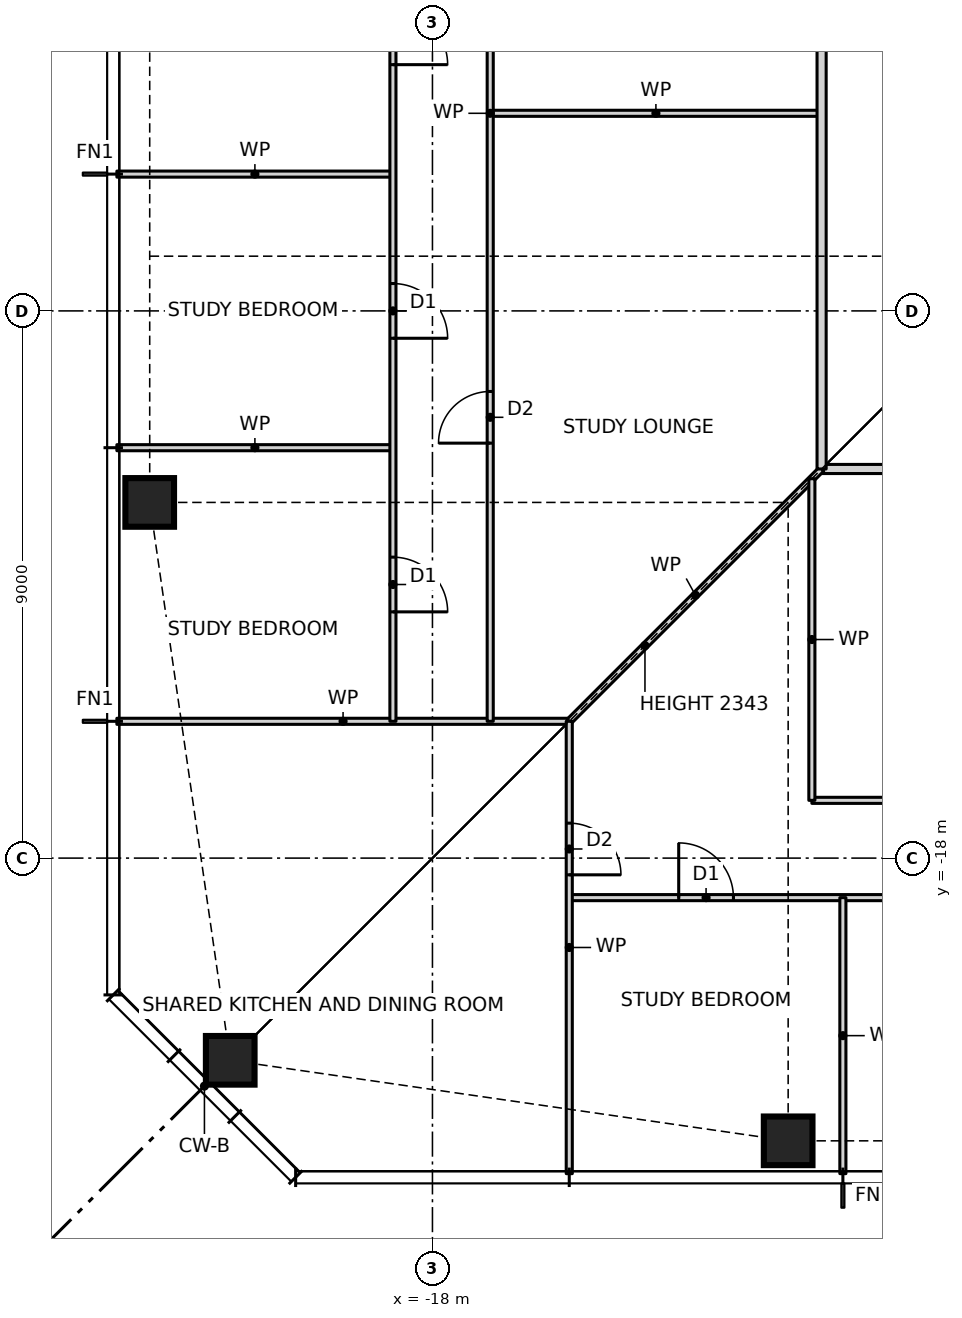
"""IFC4 building model, lengths in metres.
Left out: names, types, materials, properties, quantities, classifications, styles, units other than length and angle.
Written with IfcOpenShell. Run it as: python <this file> out.ifc"""

import sys

from ifc_helpers import new_model, si_unit, direction, frame, frame_2d, origin, origin_2d, place, context, subcontext, project, spatial, rectangle, hollow_rectangle, extrude, element, fill, save


model = new_model("IFC4")
c1 = context("Model", 3, precision=1e-05, world=origin(), true_north=direction((0.0, 1.0)))
c2 = subcontext(c1, "Body", "Model", "MODEL_VIEW")
j1 = project(units=[si_unit("LENGTHUNIT", "METRE"), si_unit("PLANEANGLEUNIT", "RADIAN")], contexts=[c1])
p1 = place(None, origin())
s1 = spatial("IfcSite", under=j1, at=p1, CompositionType="ELEMENT")
p2 = place(p1, origin())
s2 = spatial("IfcBuilding", under=s1, at=p2, CompositionType="ELEMENT")
p3 = place(p2, frame((0.0, 0.0, 29.0)))
s3 = spatial("IfcBuildingStorey", under=s2, at=p3, CompositionType="ELEMENT", Elevation=29.0)
for number, where, z_axis, x_axis in (
    (1, (-21.326, -21.326, 0.0), (0.0, 0.0, 1.0), (1.0, 0.0, 0.0)),
    (2, (-12.15, -22.65, 0.0), (0.0, 0.0, 1.0), (1.0, 0.0, 0.0)),
    (3, (-22.65, -12.15, 0.0), (0.0, 0.0, 1.0), (1.0, 0.0, 0.0)),
):
    element("IfcColumn", number, at=place(p3, frame(where, z_axis=z_axis, x_axis=x_axis)), inside=s3, PredefinedType="COLUMN", context=c2, shape_type="SweptSolid", body=[
        extrude(hollow_rectangle(XDim=0.8, YDim=0.8, WallThickness=0.09, at=origin_2d()), origin(), (0.0, 0.0, 1.0), 3.5),
    ])
p4 = place(p3, frame((-15.75, -18.65, 0.0), z_axis=(0.0, 0.0, 1.0), x_axis=(1.0, 0.0, 0.0)))
e4 = element("IfcWall", 4, at=p4, inside=s3, PredefinedType="PARTITIONING", context=c2, shape_type="SweptSolid", body=[
    extrude(rectangle(XDim=27.0, YDim=0.1, at=frame_2d((13.5, 0.0))), origin(), (0.0, 0.0, 1.0), 3.27),
])
p5 = place(p4, frame((1.8, 0.0, 0.0)))
e5 = element("IfcOpeningElement", 5, at=p5, cuts=e4, PredefinedType="OPENING", context=c2, shape_type="SweptSolid", body=[
    extrude(rectangle(XDim=0.9, YDim=2.1, at=frame_2d((0.45, 1.05))), frame((0.0, 0.06, 0.0), z_axis=(0.0, -1.0, 0.0), x_axis=(1.0, 0.0, 0.0)), (0.0, 0.0, 1.0), 0.12),
])
p6 = place(p4, frame((6.3, 0.0, 0.0)))
e6 = element("IfcOpeningElement", 6, at=p6, cuts=e4, PredefinedType="OPENING", context=c2, shape_type="SweptSolid", body=[
    extrude(rectangle(XDim=0.9, YDim=2.1, at=frame_2d((0.45, 1.05))), frame((0.0, 0.06, 0.0), z_axis=(0.0, -1.0, 0.0), x_axis=(1.0, 0.0, 0.0)), (0.0, 0.0, 1.0), 0.12),
])
p7 = place(p4, frame((10.8, 0.0, 0.0)))
e7 = element("IfcOpeningElement", 7, at=p7, cuts=e4, PredefinedType="OPENING", context=c2, shape_type="SweptSolid", body=[
    extrude(rectangle(XDim=0.9, YDim=2.1, at=frame_2d((0.45, 1.05))), frame((0.0, 0.06, 0.0), z_axis=(0.0, -1.0, 0.0), x_axis=(1.0, 0.0, 0.0)), (0.0, 0.0, 1.0), 0.12),
])
p8 = place(p4, frame((15.3, 0.0, 0.0)))
e8 = element("IfcOpeningElement", 8, at=p8, cuts=e4, PredefinedType="OPENING", context=c2, shape_type="SweptSolid", body=[
    extrude(rectangle(XDim=0.9, YDim=2.1, at=frame_2d((0.45, 1.05))), frame((0.0, 0.06, 0.0), z_axis=(0.0, -1.0, 0.0), x_axis=(1.0, 0.0, 0.0)), (0.0, 0.0, 1.0), 0.12),
])
p9 = place(p4, frame((19.8, 0.0, 0.0)))
e9 = element("IfcOpeningElement", 9, at=p9, cuts=e4, PredefinedType="OPENING", context=c2, shape_type="SweptSolid", body=[
    extrude(rectangle(XDim=0.9, YDim=2.1, at=frame_2d((0.45, 1.05))), frame((0.0, 0.06, 0.0), z_axis=(0.0, -1.0, 0.0), x_axis=(1.0, 0.0, 0.0)), (0.0, 0.0, 1.0), 0.12),
])
p10 = place(p4, frame((24.3, 0.0, 0.0)))
e10 = element("IfcOpeningElement", 10, at=p10, cuts=e4, PredefinedType="OPENING", context=c2, shape_type="SweptSolid", body=[
    extrude(rectangle(XDim=0.9, YDim=2.1, at=frame_2d((0.45, 1.05))), frame((0.0, 0.06, 0.0), z_axis=(0.0, -1.0, 0.0), x_axis=(1.0, 0.0, 0.0)), (0.0, 0.0, 1.0), 0.12),
])
p11 = place(p3, frame((-11.76, -17.05, 0.0), z_axis=(0.0, 0.0, 1.0), x_axis=(1.0, 0.0, 0.0)))
e11 = element("IfcWall", 11, at=p11, inside=s3, PredefinedType="PARTITIONING", context=c2, shape_type="SweptSolid", body=[
    extrude(rectangle(XDim=15.51, YDim=0.1, at=frame_2d((7.755, 0.0))), origin(), (0.0, 0.0, 1.0), 3.27),
])
p12 = place(p11, frame((7.33, 0.0, 0.0)))
e12 = element("IfcOpeningElement", 12, at=p12, cuts=e11, PredefinedType="OPENING", context=c2, shape_type="SweptSolid", body=[
    extrude(rectangle(XDim=0.85, YDim=2.1, at=frame_2d((0.425, 1.05))), frame((0.0, 0.06, 0.0), z_axis=(0.0, -1.0, 0.0), x_axis=(1.0, 0.0, 0.0)), (0.0, 0.0, 1.0), 0.12),
])
p13 = place(p3, frame((-23.19, -15.75, 0.0), z_axis=(0.0, 0.0, 1.0), x_axis=(1.0, 0.0, 0.0)))
e13 = element("IfcWall", 13, at=p13, inside=s3, PredefinedType="PARTITIONING", context=c2, shape_type="SweptSolid", body=[
    extrude(rectangle(XDim=7.44, YDim=0.1, at=frame_2d((3.72, 0.0))), origin(), (0.0, 0.0, 1.0), 3.27),
])
p14 = place(p3, frame((-11.6, -11.6, 0.0), z_axis=(0.0, 0.0, 1.0), x_axis=(1.0, 0.0, 0.0)))
e14 = element("IfcWall", 14, at=p14, inside=s3, PredefinedType="PARTITIONING", context=c2, shape_type="SweptSolid", body=[
    extrude(rectangle(XDim=24.2, YDim=0.15, at=frame_2d((12.1, 0.0))), origin(), (0.0, 0.0, 1.0), 3.27),
])
p15 = place(p14, frame((16.05, 0.0, 0.0)))
e15 = element("IfcOpeningElement", 15, at=p15, cuts=e14, PredefinedType="OPENING", context=c2, shape_type="SweptSolid", body=[
    extrude(rectangle(XDim=1.0, YDim=2.1, at=frame_2d((0.5, 1.05))), frame((0.0, 0.085, 0.0), z_axis=(0.0, -1.0, 0.0), x_axis=(1.0, 0.0, 0.0)), (0.0, 0.0, 1.0), 0.17),
])
for number, where, z_axis, x_axis in (
    (16, (-23.19, -11.25, 0.0), (0.0, 0.0, 1.0), (1.0, 0.0, 0.0)),
    (17, (-23.19, -6.75, 0.0), (0.0, 0.0, 1.0), (1.0, 0.0, 0.0)),
):
    element("IfcWall", number, at=place(p3, frame(where, z_axis=z_axis, x_axis=x_axis)), inside=s3, PredefinedType="PARTITIONING", context=c2, shape_type="SweptSolid", body=[
        extrude(rectangle(XDim=4.54, YDim=0.1, at=frame_2d((2.27, 0.0))), origin(), (0.0, 0.0, 1.0), 3.27),
    ])
p16 = place(p3, frame((-17.05, -5.75, 0.0), z_axis=(0.0, 0.0, 1.0), x_axis=(1.0, 0.0, 0.0)))
e18 = element("IfcWall", 18, at=p16, inside=s3, PredefinedType="PARTITIONING", context=c2, shape_type="SweptSolid", body=[
    extrude(rectangle(XDim=5.45, YDim=0.1, at=frame_2d((2.725, 0.0))), origin(), (0.0, 0.0, 1.0), 3.27),
])
p17 = place(p3, frame((-15.75, -15.75, 0.0), z_axis=(0.0, 0.0, 1.0), x_axis=(0.707106781187, 0.707106781187, 0.0)))
e19 = element("IfcWall", 19, at=p17, inside=s3, PredefinedType="PARTITIONING", context=c2, shape_type="SweptSolid", body=[
    extrude(rectangle(XDim=5.869, YDim=0.1, at=frame_2d((2.935, 0.0))), origin(), (0.0, 0.0, 1.0), 2.343),
])
p18 = place(p3, frame((-11.25, -23.19, 0.0), z_axis=(0.0, 0.0, 1.0), x_axis=(0.0, 1.0, 0.0)))
e20 = element("IfcWall", 20, at=p18, inside=s3, PredefinedType="PARTITIONING", context=c2, shape_type="SweptSolid", body=[
    extrude(rectangle(XDim=4.54, YDim=0.1, at=frame_2d((2.27, 0.0))), origin(), (0.0, 0.0, 1.0), 3.27),
])
p19 = place(p3, frame((-11.6, -11.6, 0.0), z_axis=(0.0, 0.0, 1.0), x_axis=(0.0, 1.0, 0.0)))
e21 = element("IfcWall", 21, at=p19, inside=s3, PredefinedType="PARTITIONING", context=c2, shape_type="SweptSolid", body=[
    extrude(rectangle(XDim=23.2, YDim=0.15, at=frame_2d((11.6, 0.0))), origin(), (0.0, 0.0, 1.0), 3.27),
])
p20 = place(p19, frame((20.55, 0.0, 0.0)))
e22 = element("IfcOpeningElement", 22, at=p20, cuts=e21, PredefinedType="OPENING", context=c2, shape_type="SweptSolid", body=[
    extrude(rectangle(XDim=1.0, YDim=2.1, at=frame_2d((0.5, 1.05))), frame((0.0, 0.085, 0.0), z_axis=(0.0, -1.0, 0.0), x_axis=(1.0, 0.0, 0.0)), (0.0, 0.0, 1.0), 0.17),
])
p21 = place(p19, frame((18.5, 0.0, 0.0)))
e23 = element("IfcOpeningElement", 23, at=p21, cuts=e21, PredefinedType="OPENING", context=c2, shape_type="SweptSolid", body=[
    extrude(rectangle(XDim=0.9, YDim=2.1, at=frame_2d((0.45, 1.05))), frame((0.0, 0.085, 0.0), z_axis=(0.0, -1.0, 0.0), x_axis=(1.0, 0.0, 0.0)), (0.0, 0.0, 1.0), 0.17),
])
p22 = place(p3, frame((-11.76, -17.05, 0.0), z_axis=(0.0, 0.0, 1.0), x_axis=(0.0, 1.0, 0.0)))
e24 = element("IfcWall", 24, at=p22, inside=s3, PredefinedType="PARTITIONING", context=c2, shape_type="SweptSolid", body=[
    extrude(rectangle(XDim=5.29, YDim=0.1, at=frame_2d((2.645, 0.0))), origin(), (0.0, 0.0, 1.0), 3.27),
])
p23 = place(p3, frame((-15.75, -23.19, 0.0), z_axis=(0.0, 0.0, 1.0), x_axis=(0.0, 1.0, 0.0)))
e25 = element("IfcWall", 25, at=p23, inside=s3, PredefinedType="PARTITIONING", context=c2, shape_type="SweptSolid", body=[
    extrude(rectangle(XDim=7.44, YDim=0.1, at=frame_2d((3.72, 0.0))), origin(), (0.0, 0.0, 1.0), 3.27),
])
p24 = place(p23, frame((4.915, 0.0, 0.0)))
e26 = element("IfcOpeningElement", 26, at=p24, cuts=e25, PredefinedType="OPENING", context=c2, shape_type="SweptSolid", body=[
    extrude(rectangle(XDim=0.85, YDim=2.1, at=frame_2d((0.425, 1.05))), frame((0.0, 0.06, 0.0), z_axis=(0.0, -1.0, 0.0), x_axis=(1.0, 0.0, 0.0)), (0.0, 0.0, 1.0), 0.12),
])
p25 = place(p3, frame((-17.05, -15.75, 0.0), z_axis=(0.0, 0.0, 1.0), x_axis=(0.0, 1.0, 0.0)))
e27 = element("IfcWall", 27, at=p25, inside=s3, PredefinedType="PARTITIONING", context=c2, shape_type="SweptSolid", body=[
    extrude(rectangle(XDim=20.0, YDim=0.1, at=frame_2d((10.0, 0.0))), origin(), (0.0, 0.0, 1.0), 3.27),
])
p26 = place(p25, frame((14.575, 0.0, 0.0)))
e28 = element("IfcOpeningElement", 28, at=p26, cuts=e27, PredefinedType="OPENING", context=c2, shape_type="SweptSolid", body=[
    extrude(rectangle(XDim=0.85, YDim=2.1, at=frame_2d((0.425, 1.05))), frame((0.0, 0.06, 0.0), z_axis=(0.0, -1.0, 0.0), x_axis=(1.0, 0.0, 0.0)), (0.0, 0.0, 1.0), 0.12),
])
p27 = place(p25, frame((4.575, 0.0, 0.0)))
e29 = element("IfcOpeningElement", 29, at=p27, cuts=e27, PredefinedType="OPENING", context=c2, shape_type="SweptSolid", body=[
    extrude(rectangle(XDim=0.85, YDim=2.1, at=frame_2d((0.425, 1.05))), frame((0.0, 0.06, 0.0), z_axis=(0.0, -1.0, 0.0), x_axis=(1.0, 0.0, 0.0)), (0.0, 0.0, 1.0), 0.12),
])
p28 = place(p3, frame((-18.65, -15.75, 0.0), z_axis=(0.0, 0.0, 1.0), x_axis=(0.0, 1.0, 0.0)))
e30 = element("IfcWall", 30, at=p28, inside=s3, PredefinedType="PARTITIONING", context=c2, shape_type="SweptSolid", body=[
    extrude(rectangle(XDim=31.5, YDim=0.1, at=frame_2d((15.75, 0.0))), origin(), (0.0, 0.0, 1.0), 3.27),
])
p29 = place(p28, frame((28.8, 0.0, 0.0)))
e31 = element("IfcOpeningElement", 31, at=p29, cuts=e30, PredefinedType="OPENING", context=c2, shape_type="SweptSolid", body=[
    extrude(rectangle(XDim=0.9, YDim=2.1, at=frame_2d((0.45, 1.05))), frame((0.0, 0.06, 0.0), z_axis=(0.0, -1.0, 0.0), x_axis=(1.0, 0.0, 0.0)), (0.0, 0.0, 1.0), 0.12),
])
p30 = place(p28, frame((24.3, 0.0, 0.0)))
e32 = element("IfcOpeningElement", 32, at=p30, cuts=e30, PredefinedType="OPENING", context=c2, shape_type="SweptSolid", body=[
    extrude(rectangle(XDim=0.9, YDim=2.1, at=frame_2d((0.45, 1.05))), frame((0.0, 0.06, 0.0), z_axis=(0.0, -1.0, 0.0), x_axis=(1.0, 0.0, 0.0)), (0.0, 0.0, 1.0), 0.12),
])
p31 = place(p28, frame((19.8, 0.0, 0.0)))
e33 = element("IfcOpeningElement", 33, at=p31, cuts=e30, PredefinedType="OPENING", context=c2, shape_type="SweptSolid", body=[
    extrude(rectangle(XDim=0.9, YDim=2.1, at=frame_2d((0.45, 1.05))), frame((0.0, 0.06, 0.0), z_axis=(0.0, -1.0, 0.0), x_axis=(1.0, 0.0, 0.0)), (0.0, 0.0, 1.0), 0.12),
])
p32 = place(p28, frame((15.3, 0.0, 0.0)))
e34 = element("IfcOpeningElement", 34, at=p32, cuts=e30, PredefinedType="OPENING", context=c2, shape_type="SweptSolid", body=[
    extrude(rectangle(XDim=0.9, YDim=2.1, at=frame_2d((0.45, 1.05))), frame((0.0, 0.06, 0.0), z_axis=(0.0, -1.0, 0.0), x_axis=(1.0, 0.0, 0.0)), (0.0, 0.0, 1.0), 0.12),
])
p33 = place(p28, frame((10.8, 0.0, 0.0)))
e35 = element("IfcOpeningElement", 35, at=p33, cuts=e30, PredefinedType="OPENING", context=c2, shape_type="SweptSolid", body=[
    extrude(rectangle(XDim=0.9, YDim=2.1, at=frame_2d((0.45, 1.05))), frame((0.0, 0.06, 0.0), z_axis=(0.0, -1.0, 0.0), x_axis=(1.0, 0.0, 0.0)), (0.0, 0.0, 1.0), 0.12),
])
p34 = place(p28, frame((6.3, 0.0, 0.0)))
e36 = element("IfcOpeningElement", 36, at=p34, cuts=e30, PredefinedType="OPENING", context=c2, shape_type="SweptSolid", body=[
    extrude(rectangle(XDim=0.9, YDim=2.1, at=frame_2d((0.45, 1.05))), frame((0.0, 0.06, 0.0), z_axis=(0.0, -1.0, 0.0), x_axis=(1.0, 0.0, 0.0)), (0.0, 0.0, 1.0), 0.12),
])
p35 = place(p28, frame((1.8, 0.0, 0.0)))
e37 = element("IfcOpeningElement", 37, at=p35, cuts=e30, PredefinedType="OPENING", context=c2, shape_type="SweptSolid", body=[
    extrude(rectangle(XDim=0.9, YDim=2.1, at=frame_2d((0.45, 1.05))), frame((0.0, 0.06, 0.0), z_axis=(0.0, -1.0, 0.0), x_axis=(1.0, 0.0, 0.0)), (0.0, 0.0, 1.0), 0.12),
])
p36 = place(p5, origin())
e38 = element("IfcDoor", 38, at=p36, inside=s3, OperationType="SINGLE_SWING_LEFT", PredefinedType="DOOR", context=c2, shape_type="SweptSolid", body=[
    extrude(rectangle(XDim=0.9, YDim=2.1, at=frame_2d((0.45, 1.05))), frame((0.0, 0.025, 0.0), z_axis=(0.0, -1.0, 0.0), x_axis=(1.0, 0.0, 0.0)), (0.0, 0.0, 1.0), 0.05),
])
fill(e5, e38)
p37 = place(p33, frame((0.9, 0.0, 0.0), z_axis=(0.0, 0.0, 1.0), x_axis=(-1.0, 0.0, 0.0)))
e39 = element("IfcDoor", 39, at=p37, inside=s3, OperationType="SINGLE_SWING_RIGHT", PredefinedType="DOOR", context=c2, shape_type="SweptSolid", body=[
    extrude(rectangle(XDim=0.9, YDim=2.1, at=frame_2d((0.45, 1.05))), frame((0.0, 0.025, 0.0), z_axis=(0.0, -1.0, 0.0), x_axis=(1.0, 0.0, 0.0)), (0.0, 0.0, 1.0), 0.05),
])
fill(e35, e39)
p38 = place(p34, frame((0.9, 0.0, 0.0), z_axis=(0.0, 0.0, 1.0), x_axis=(-1.0, 0.0, 0.0)))
e40 = element("IfcDoor", 40, at=p38, inside=s3, OperationType="SINGLE_SWING_RIGHT", PredefinedType="DOOR", context=c2, shape_type="SweptSolid", body=[
    extrude(rectangle(XDim=0.9, YDim=2.1, at=frame_2d((0.45, 1.05))), frame((0.0, 0.025, 0.0), z_axis=(0.0, -1.0, 0.0), x_axis=(1.0, 0.0, 0.0)), (0.0, 0.0, 1.0), 0.05),
])
fill(e36, e40)
p39 = place(p35, frame((0.9, 0.0, 0.0), z_axis=(0.0, 0.0, 1.0), x_axis=(-1.0, 0.0, 0.0)))
e41 = element("IfcDoor", 41, at=p39, inside=s3, OperationType="SINGLE_SWING_RIGHT", PredefinedType="DOOR", context=c2, shape_type="SweptSolid", body=[
    extrude(rectangle(XDim=0.9, YDim=2.1, at=frame_2d((0.45, 1.05))), frame((0.0, 0.025, 0.0), z_axis=(0.0, -1.0, 0.0), x_axis=(1.0, 0.0, 0.0)), (0.0, 0.0, 1.0), 0.05),
])
fill(e37, e41)
p40 = place(p27, origin())
e42 = element("IfcDoor", 42, at=p40, inside=s3, OperationType="SINGLE_SWING_LEFT", PredefinedType="DOOR", context=c2, shape_type="SweptSolid", body=[
    extrude(rectangle(XDim=0.85, YDim=2.1, at=frame_2d((0.425, 1.05))), frame((0.0, 0.025, 0.0), z_axis=(0.0, -1.0, 0.0), x_axis=(1.0, 0.0, 0.0)), (0.0, 0.0, 1.0), 0.05),
])
fill(e29, e42)
p41 = place(p24, frame((0.85, 0.0, 0.0), z_axis=(0.0, 0.0, 1.0), x_axis=(-1.0, 0.0, 0.0)))
e43 = element("IfcDoor", 43, at=p41, inside=s3, OperationType="SINGLE_SWING_RIGHT", PredefinedType="DOOR", context=c2, shape_type="SweptSolid", body=[
    extrude(rectangle(XDim=0.85, YDim=2.1, at=frame_2d((0.425, 1.05))), frame((0.0, 0.025, 0.0), z_axis=(0.0, -1.0, 0.0), x_axis=(1.0, 0.0, 0.0)), (0.0, 0.0, 1.0), 0.05),
])
fill(e26, e43)
save(model, sys.argv[1])
